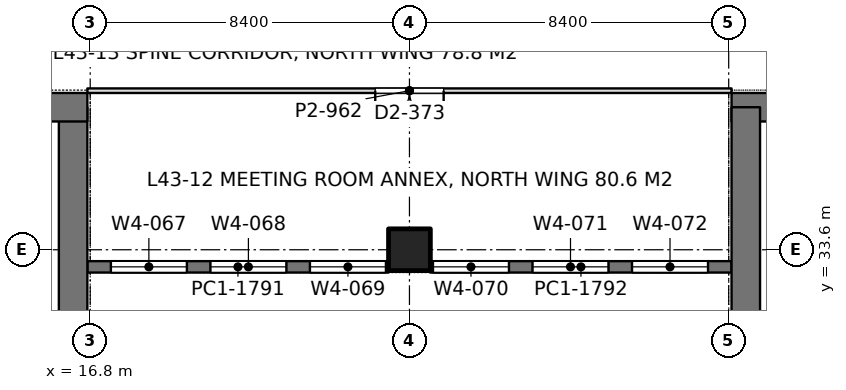
"""IFC4 building model, lengths in metres.
Left out: names, types, materials, properties, quantities, classifications, styles, units other than length and angle.
Written with IfcOpenShell. Run it as: python <this file> out.ifc"""

import sys

from ifc_helpers import new_model, si_unit, direction, frame, frame_2d, origin, origin_2d, place, context, subcontext, project, spatial, rectangle, extrude, element, fill, save


model = new_model("IFC4")
c1 = context("Model", 3, precision=1e-05, world=origin(), true_north=direction((0.0, 1.0)))
c2 = subcontext(c1, "Body", "Model", "MODEL_VIEW")
j1 = project(units=[si_unit("LENGTHUNIT", "METRE"), si_unit("PLANEANGLEUNIT", "RADIAN")], contexts=[c1])
p1 = place(None, origin())
s1 = spatial("IfcSite", under=j1, at=p1, CompositionType="ELEMENT")
p2 = place(p1, origin())
s2 = spatial("IfcBuilding", under=s1, at=p2, CompositionType="ELEMENT")
p3 = place(p2, frame((0.0, 0.0, 190.2)))
s3 = spatial("IfcBuildingStorey", under=s2, at=p3, CompositionType="ELEMENT", Elevation=190.2)
p4 = place(p3, frame((25.2, 33.6, 0.0), z_axis=(0.0, 0.0, 1.0), x_axis=(1.0, 0.0, 0.0)))
e1 = element("IfcColumn", 1, at=p4, inside=s3, PredefinedType="COLUMN", context=c2, shape_type="SweptSolid", body=[
    extrude(rectangle(XDim=1.1, YDim=1.1, at=origin_2d()), origin(), (0.0, 0.0, 1.0), 4.2),
])
p5 = place(p3, frame((-1.125, 37.35, 0.0), z_axis=(0.0, 0.0, 1.0), x_axis=(1.0, 0.0, 0.0)))
e2 = element("IfcWall", 2, at=p5, inside=s3, PredefinedType="SHEAR", context=c2, shape_type="SweptSolid", body=[
    extrude(rectangle(XDim=17.85, YDim=0.75, at=frame_2d((8.925, 0.0))), origin(), (0.0, 0.0, 1.0), 4.2),
])
p6 = place(p5, frame((8.875, 0.0, 0.0)))
e3 = element("IfcOpeningElement", 3, at=p6, cuts=e2, PredefinedType="OPENING", context=c2, shape_type="SweptSolid", body=[
    extrude(rectangle(XDim=1.8, YDim=2.4, at=frame_2d((0.9, 1.2))), frame((0.0, 0.385, 0.0), z_axis=(0.0, -1.0, 0.0), x_axis=(1.0, 0.0, 0.0)), (0.0, 0.0, 1.0), 0.77),
])
p7 = place(p3, frame((16.35, 27.8, 0.0), z_axis=(0.0, 0.0, 1.0), x_axis=(0.0, 1.0, 0.0)))
e4 = element("IfcWall", 4, at=p7, inside=s3, PredefinedType="SHEAR", context=c2, shape_type="SweptSolid", body=[
    extrude(rectangle(XDim=9.55, YDim=0.75, at=frame_2d((4.775, 0.0))), origin(), (0.0, 0.0, 1.0), 4.2),
])
p8 = place(p3, frame((33.675, 37.35, 0.0), z_axis=(0.0, 0.0, 1.0), x_axis=(1.0, 0.0, 0.0)))
e5 = element("IfcWall", 5, at=p8, inside=s3, PredefinedType="SHEAR", context=c2, shape_type="SweptSolid", body=[
    extrude(rectangle(XDim=17.85, YDim=0.75, at=frame_2d((8.925, 0.0))), origin(), (0.0, 0.0, 1.0), 4.2),
])
p9 = place(p8, frame((7.175, 0.0, 0.0)))
e6 = element("IfcOpeningElement", 6, at=p9, cuts=e5, PredefinedType="OPENING", context=c2, shape_type="SweptSolid", body=[
    extrude(rectangle(XDim=1.8, YDim=2.4, at=frame_2d((0.9, 1.2))), frame((0.0, 0.385, 0.0), z_axis=(0.0, -1.0, 0.0), x_axis=(1.0, 0.0, 0.0)), (0.0, 0.0, 1.0), 0.77),
])
p10 = place(p3, frame((34.05, 27.8, 0.0), z_axis=(0.0, 0.0, 1.0), x_axis=(0.0, 1.0, 0.0)))
e7 = element("IfcWall", 7, at=p10, inside=s3, PredefinedType="SHEAR", context=c2, shape_type="SweptSolid", body=[
    extrude(rectangle(XDim=9.55, YDim=0.75, at=frame_2d((4.775, 0.0))), origin(), (0.0, 0.0, 1.0), 4.2),
])
p11 = place(p3, frame((16.725, 33.15, 0.0), z_axis=(0.0, 0.0, 1.0), x_axis=(1.0, 0.0, 0.0)))
e8 = element("IfcWall", 8, at=p11, inside=s3, PredefinedType="SOLIDWALL", context=c2, shape_type="SweptSolid", body=[
    extrude(rectangle(XDim=7.925, YDim=0.3, at=frame_2d((3.962, 0.0))), origin(), (0.0, 0.0, 1.0), 4.05),
])
p12 = place(p11, frame((0.619, 0.0, 0.9)))
e9 = element("IfcOpeningElement", 9, at=p12, cuts=e8, PredefinedType="OPENING", context=c2, shape_type="SweptSolid", body=[
    extrude(rectangle(XDim=2.0, YDim=1.9, at=frame_2d((1.0, 0.95))), frame((0.0, 0.16, 0.0), z_axis=(0.0, -1.0, 0.0), x_axis=(1.0, 0.0, 0.0)), (0.0, 0.0, 1.0), 0.32),
])
p13 = place(p11, frame((3.238, 0.0, 0.9)))
e10 = element("IfcOpeningElement", 10, at=p13, cuts=e8, PredefinedType="OPENING", context=c2, shape_type="SweptSolid", body=[
    extrude(rectangle(XDim=2.0, YDim=1.9, at=frame_2d((1.0, 0.95))), frame((0.0, 0.16, 0.0), z_axis=(0.0, -1.0, 0.0), x_axis=(1.0, 0.0, 0.0)), (0.0, 0.0, 1.0), 0.32),
])
p14 = place(p11, frame((5.856, 0.0, 0.9)))
e11 = element("IfcOpeningElement", 11, at=p14, cuts=e8, PredefinedType="OPENING", context=c2, shape_type="SweptSolid", body=[
    extrude(rectangle(XDim=2.0, YDim=1.9, at=frame_2d((1.0, 0.95))), frame((0.0, 0.16, 0.0), z_axis=(0.0, -1.0, 0.0), x_axis=(1.0, 0.0, 0.0)), (0.0, 0.0, 1.0), 0.32),
])
p15 = place(p3, frame((25.75, 33.15, 0.0), z_axis=(0.0, 0.0, 1.0), x_axis=(1.0, 0.0, 0.0)))
e12 = element("IfcWall", 12, at=p15, inside=s3, PredefinedType="SOLIDWALL", context=c2, shape_type="SweptSolid", body=[
    extrude(rectangle(XDim=7.925, YDim=0.3, at=frame_2d((3.962, 0.0))), origin(), (0.0, 0.0, 1.0), 4.05),
])
p16 = place(p15, frame((0.069, 0.0, 0.9)))
e13 = element("IfcOpeningElement", 13, at=p16, cuts=e12, PredefinedType="OPENING", context=c2, shape_type="SweptSolid", body=[
    extrude(rectangle(XDim=2.0, YDim=1.9, at=frame_2d((1.0, 0.95))), frame((0.0, 0.16, 0.0), z_axis=(0.0, -1.0, 0.0), x_axis=(1.0, 0.0, 0.0)), (0.0, 0.0, 1.0), 0.32),
])
p17 = place(p15, frame((2.688, 0.0, 0.9)))
e14 = element("IfcOpeningElement", 14, at=p17, cuts=e12, PredefinedType="OPENING", context=c2, shape_type="SweptSolid", body=[
    extrude(rectangle(XDim=2.0, YDim=1.9, at=frame_2d((1.0, 0.95))), frame((0.0, 0.16, 0.0), z_axis=(0.0, -1.0, 0.0), x_axis=(1.0, 0.0, 0.0)), (0.0, 0.0, 1.0), 0.32),
])
p18 = place(p15, frame((5.306, 0.0, 0.9)))
e15 = element("IfcOpeningElement", 15, at=p18, cuts=e12, PredefinedType="OPENING", context=c2, shape_type="SweptSolid", body=[
    extrude(rectangle(XDim=2.0, YDim=1.9, at=frame_2d((1.0, 0.95))), frame((0.0, 0.16, 0.0), z_axis=(0.0, -1.0, 0.0), x_axis=(1.0, 0.0, 0.0)), (0.0, 0.0, 1.0), 0.32),
])
p19 = place(p3, frame((16.725, 37.785, 0.0), z_axis=(0.0, 0.0, 1.0), x_axis=(1.0, 0.0, 0.0)))
e16 = element("IfcWall", 16, at=p19, inside=s3, PredefinedType="PARTITIONING", context=c2, shape_type="SweptSolid", body=[
    extrude(rectangle(XDim=16.95, YDim=0.12, at=frame_2d((8.475, 0.0))), origin(), (0.0, 0.0, 1.0), 3.55),
])
p20 = place(p19, frame((7.575, 0.0, 0.0)))
e17 = element("IfcOpeningElement", 17, at=p20, cuts=e16, PredefinedType="OPENING", context=c2, shape_type="SweptSolid", body=[
    extrude(rectangle(XDim=1.8, YDim=2.2, at=frame_2d((0.9, 1.1))), frame((0.0, 0.07, 0.0), z_axis=(0.0, -1.0, 0.0), x_axis=(1.0, 0.0, 0.0)), (0.0, 0.0, 1.0), 0.14),
])
p21 = place(p12, origin())
e18 = element("IfcWindow", 18, at=p21, inside=s3, PartitioningType="SINGLE_PANEL", PredefinedType="WINDOW", context=c2, shape_type="SweptSolid", body=[
    extrude(rectangle(XDim=2.0, YDim=1.9, at=frame_2d((1.0, 0.95))), frame((0.0, 0.03, 0.0), z_axis=(0.0, -1.0, 0.0), x_axis=(1.0, 0.0, 0.0)), (0.0, 0.0, 1.0), 0.06),
])
fill(e9, e18)
p22 = place(p13, origin())
e19 = element("IfcWindow", 19, at=p22, inside=s3, PartitioningType="SINGLE_PANEL", PredefinedType="WINDOW", context=c2, shape_type="SweptSolid", body=[
    extrude(rectangle(XDim=2.0, YDim=1.9, at=frame_2d((1.0, 0.95))), frame((0.0, 0.03, 0.0), z_axis=(0.0, -1.0, 0.0), x_axis=(1.0, 0.0, 0.0)), (0.0, 0.0, 1.0), 0.06),
])
fill(e10, e19)
p23 = place(p14, origin())
e20 = element("IfcWindow", 20, at=p23, inside=s3, PartitioningType="SINGLE_PANEL", PredefinedType="WINDOW", context=c2, shape_type="SweptSolid", body=[
    extrude(rectangle(XDim=2.0, YDim=1.9, at=frame_2d((1.0, 0.95))), frame((0.0, 0.03, 0.0), z_axis=(0.0, -1.0, 0.0), x_axis=(1.0, 0.0, 0.0)), (0.0, 0.0, 1.0), 0.06),
])
fill(e11, e20)
p24 = place(p16, origin())
e21 = element("IfcWindow", 21, at=p24, inside=s3, PartitioningType="SINGLE_PANEL", PredefinedType="WINDOW", context=c2, shape_type="SweptSolid", body=[
    extrude(rectangle(XDim=2.0, YDim=1.9, at=frame_2d((1.0, 0.95))), frame((0.0, 0.03, 0.0), z_axis=(0.0, -1.0, 0.0), x_axis=(1.0, 0.0, 0.0)), (0.0, 0.0, 1.0), 0.06),
])
fill(e13, e21)
p25 = place(p17, origin())
e22 = element("IfcWindow", 22, at=p25, inside=s3, PartitioningType="SINGLE_PANEL", PredefinedType="WINDOW", context=c2, shape_type="SweptSolid", body=[
    extrude(rectangle(XDim=2.0, YDim=1.9, at=frame_2d((1.0, 0.95))), frame((0.0, 0.03, 0.0), z_axis=(0.0, -1.0, 0.0), x_axis=(1.0, 0.0, 0.0)), (0.0, 0.0, 1.0), 0.06),
])
fill(e14, e22)
p26 = place(p18, origin())
e23 = element("IfcWindow", 23, at=p26, inside=s3, PartitioningType="SINGLE_PANEL", PredefinedType="WINDOW", context=c2, shape_type="SweptSolid", body=[
    extrude(rectangle(XDim=2.0, YDim=1.9, at=frame_2d((1.0, 0.95))), frame((0.0, 0.03, 0.0), z_axis=(0.0, -1.0, 0.0), x_axis=(1.0, 0.0, 0.0)), (0.0, 0.0, 1.0), 0.06),
])
fill(e15, e23)
p27 = place(p20, frame((1.8, 0.0, 0.0), z_axis=(0.0, 0.0, 1.0), x_axis=(-1.0, 0.0, 0.0)))
e24 = element("IfcDoor", 24, at=p27, inside=s3, OperationType="DOUBLE_DOOR_SINGLE_SWING", PredefinedType="DOOR", context=c2, shape_type="SweptSolid", body=[
    extrude(rectangle(XDim=1.8, YDim=2.2, at=frame_2d((0.9, 1.1))), frame((0.0, 0.025, 0.0), z_axis=(0.0, -1.0, 0.0), x_axis=(1.0, 0.0, 0.0)), (0.0, 0.0, 1.0), 0.05),
])
fill(e17, e24)
save(model, sys.argv[1])
